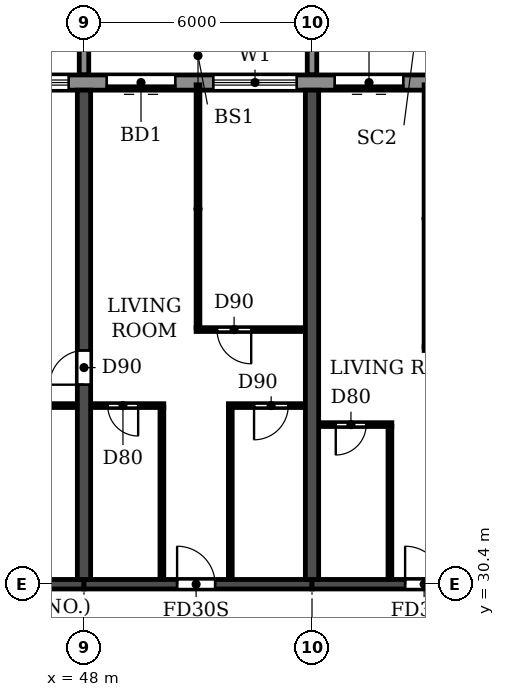
"""IFC4 building model, lengths in metres.
Left out: names, types, materials, properties, quantities, classifications, styles, units other than length and angle.
Written with IfcOpenShell. Run it as: python <this file> out.ifc"""

import sys

from ifc_helpers import new_model, si_unit, direction, frame, frame_2d, origin, place, context, subcontext, project, spatial, polyline, rectangle, outline, extrude, source, transform, mapped, element, fill, save


model = new_model("IFC4")
c1 = context("Model", 3, precision=1e-05, world=origin(), true_north=direction((0.0, 1.0)))
c2 = subcontext(c1, "Body", "Model", "MODEL_VIEW")
j1 = project(units=[si_unit("LENGTHUNIT", "METRE"), si_unit("PLANEANGLEUNIT", "RADIAN")], contexts=[c1])
p1 = place(None, origin())
s1 = spatial("IfcSite", under=j1, at=p1, CompositionType="ELEMENT")
p2 = place(p1, origin())
s2 = spatial("IfcBuilding", under=s1, at=p2, CompositionType="ELEMENT")
p3 = place(p2, frame((0.0, 0.0, 109.2)))
s3 = spatial("IfcBuildingStorey", under=s2, at=p3, CompositionType="ELEMENT", Elevation=109.2)
p4 = place(p3, frame((48.0, 30.525, 0.0), z_axis=(0.0, 0.0, 1.0), x_axis=(0.0, 1.0, 0.0)))
e1 = element("IfcWall", 1, at=p4, inside=s3, PredefinedType="SHEAR", context=c2, shape_type="SweptSolid", body=[
    extrude(rectangle(XDim=12.875, YDim=0.35, at=frame_2d((6.438, 0.0))), origin(), (0.0, 0.0, 1.0), 3.06),
])
p5 = place(p4, frame((5.125, 0.0, 0.0)))
e2 = element("IfcOpeningElement", 2, at=p5, cuts=e1, PredefinedType="OPENING", context=c2, shape_type="SweptSolid", body=[
    extrude(rectangle(XDim=0.9, YDim=2.1, at=frame_2d((0.45, 1.05))), frame((0.0, 0.185, 0.0), z_axis=(0.0, -1.0, 0.0), x_axis=(1.0, 0.0, 0.0)), (0.0, 0.0, 1.0), 0.37),
])
p6 = place(p3, frame((54.0, 30.525, 0.0), z_axis=(0.0, 0.0, 1.0), x_axis=(0.0, 1.0, 0.0)))
e3 = element("IfcWall", 3, at=p6, inside=s3, PredefinedType="SHEAR", context=c2, shape_type="SweptSolid", body=[
    extrude(rectangle(XDim=12.875, YDim=0.35, at=frame_2d((6.438, 0.0))), origin(), (0.0, 0.0, 1.0), 3.06),
])
p7 = place(p3, frame((42.0, 30.4, 0.0), z_axis=(0.0, 0.0, 1.0), x_axis=(1.0, 0.0, 0.0)))
e4 = element("IfcWall", 4, at=p7, inside=s3, PredefinedType="SHEAR", context=c2, shape_type="SweptSolid", body=[
    extrude(rectangle(XDim=6.0, YDim=0.25, at=frame_2d((3.0, 0.0))), origin(), (0.0, 0.0, 1.0), 2.46),
])
p8 = place(p3, frame((48.0, 30.4, 0.0), z_axis=(0.0, 0.0, 1.0), x_axis=(1.0, 0.0, 0.0)))
e5 = element("IfcWall", 5, at=p8, inside=s3, PredefinedType="SHEAR", context=c2, shape_type="SweptSolid", body=[
    extrude(rectangle(XDim=6.0, YDim=0.25, at=frame_2d((3.0, 0.0))), origin(), (0.0, 0.0, 1.0), 2.46),
])
p9 = place(p8, frame((2.45, 0.0, 0.0)))
e6 = element("IfcOpeningElement", 6, at=p9, cuts=e5, PredefinedType="OPENING", context=c2, shape_type="SweptSolid", body=[
    extrude(rectangle(XDim=1.0, YDim=2.1, at=frame_2d((0.5, 1.05))), frame((0.0, 0.135, 0.0), z_axis=(0.0, -1.0, 0.0), x_axis=(1.0, 0.0, 0.0)), (0.0, 0.0, 1.0), 0.27),
])
p10 = place(p3, frame((54.0, 30.4, 0.0), z_axis=(0.0, 0.0, 1.0), x_axis=(1.0, 0.0, 0.0)))
e7 = element("IfcWall", 7, at=p10, inside=s3, PredefinedType="SHEAR", context=c2, shape_type="SweptSolid", body=[
    extrude(rectangle(XDim=6.0, YDim=0.25, at=frame_2d((3.0, 0.0))), origin(), (0.0, 0.0, 1.0), 2.46),
])
p11 = place(p10, frame((2.45, 0.0, 0.0)))
e8 = element("IfcOpeningElement", 8, at=p11, cuts=e7, PredefinedType="OPENING", context=c2, shape_type="SweptSolid", body=[
    extrude(rectangle(XDim=1.0, YDim=2.1, at=frame_2d((0.5, 1.05))), frame((0.0, 0.135, 0.0), z_axis=(0.0, -1.0, 0.0), x_axis=(1.0, 0.0, 0.0)), (0.0, 0.0, 1.0), 0.27),
])
p12 = place(p3, frame((85.317, 43.6, 0.0), z_axis=(0.0, 0.0, 1.0), x_axis=(-1.0, 0.0, 0.0)))
e9 = element("IfcWall", 9, at=p12, inside=s3, PredefinedType="STANDARD", context=c2, shape_type="SweptSolid", body=[
    extrude(rectangle(XDim=68.634, YDim=0.4, at=frame_2d((34.317, 0.0))), origin(), (0.0, 0.0, 1.0), 3.06),
])
p13 = place(p12, frame((64.917, 0.0, 0.0)))
e10 = element("IfcOpeningElement", 10, at=p13, cuts=e9, PredefinedType="OPENING", context=c2, shape_type="SweptSolid", body=[
    extrude(rectangle(XDim=1.8, YDim=2.4, at=frame_2d((0.9, 1.2))), frame((0.0, 0.21, 0.0), z_axis=(0.0, -1.0, 0.0), x_axis=(1.0, 0.0, 0.0)), (0.0, 0.0, 1.0), 0.42),
])
p14 = place(p12, frame((61.717, 0.0, 0.9)))
e11 = element("IfcOpeningElement", 11, at=p14, cuts=e9, PredefinedType="OPENING", context=c2, shape_type="SweptSolid", body=[
    extrude(rectangle(XDim=2.2, YDim=1.5, at=frame_2d((1.1, 0.75))), frame((0.0, 0.21, 0.0), z_axis=(0.0, -1.0, 0.0), x_axis=(1.0, 0.0, 0.0)), (0.0, 0.0, 1.0), 0.42),
])
p15 = place(p12, frame((58.717, 0.0, 0.9)))
e12 = element("IfcOpeningElement", 12, at=p15, cuts=e9, PredefinedType="OPENING", context=c2, shape_type="SweptSolid", body=[
    extrude(rectangle(XDim=2.2, YDim=1.5, at=frame_2d((1.1, 0.75))), frame((0.0, 0.21, 0.0), z_axis=(0.0, -1.0, 0.0), x_axis=(1.0, 0.0, 0.0)), (0.0, 0.0, 1.0), 0.42),
])
p16 = place(p12, frame((55.917, 0.0, 0.0)))
e13 = element("IfcOpeningElement", 13, at=p16, cuts=e9, PredefinedType="OPENING", context=c2, shape_type="SweptSolid", body=[
    extrude(rectangle(XDim=1.8, YDim=2.4, at=frame_2d((0.9, 1.2))), frame((0.0, 0.21, 0.0), z_axis=(0.0, -1.0, 0.0), x_axis=(1.0, 0.0, 0.0)), (0.0, 0.0, 1.0), 0.42),
])
p17 = place(p12, frame((52.917, 0.0, 0.0)))
e14 = element("IfcOpeningElement", 14, at=p17, cuts=e9, PredefinedType="OPENING", context=c2, shape_type="SweptSolid", body=[
    extrude(rectangle(XDim=1.8, YDim=2.4, at=frame_2d((0.9, 1.2))), frame((0.0, 0.21, 0.0), z_axis=(0.0, -1.0, 0.0), x_axis=(1.0, 0.0, 0.0)), (0.0, 0.0, 1.0), 0.42),
])
p18 = place(p12, frame((49.717, 0.0, 0.9)))
e15 = element("IfcOpeningElement", 15, at=p18, cuts=e9, PredefinedType="OPENING", context=c2, shape_type="SweptSolid", body=[
    extrude(rectangle(XDim=2.2, YDim=1.5, at=frame_2d((1.1, 0.75))), frame((0.0, 0.21, 0.0), z_axis=(0.0, -1.0, 0.0), x_axis=(1.0, 0.0, 0.0)), (0.0, 0.0, 1.0), 0.42),
])
p19 = place(p12, frame((46.717, 0.0, 0.9)))
e16 = element("IfcOpeningElement", 16, at=p19, cuts=e9, PredefinedType="OPENING", context=c2, shape_type="SweptSolid", body=[
    extrude(rectangle(XDim=2.2, YDim=1.5, at=frame_2d((1.1, 0.75))), frame((0.0, 0.21, 0.0), z_axis=(0.0, -1.0, 0.0), x_axis=(1.0, 0.0, 0.0)), (0.0, 0.0, 1.0), 0.42),
])
p20 = place(p12, frame((43.917, 0.0, 0.0)))
e17 = element("IfcOpeningElement", 17, at=p20, cuts=e9, PredefinedType="OPENING", context=c2, shape_type="SweptSolid", body=[
    extrude(rectangle(XDim=1.8, YDim=2.4, at=frame_2d((0.9, 1.2))), frame((0.0, 0.21, 0.0), z_axis=(0.0, -1.0, 0.0), x_axis=(1.0, 0.0, 0.0)), (0.0, 0.0, 1.0), 0.42),
])
p21 = place(p12, frame((40.717, 0.0, 0.9)))
e18 = element("IfcOpeningElement", 18, at=p21, cuts=e9, PredefinedType="OPENING", context=c2, shape_type="SweptSolid", body=[
    extrude(rectangle(XDim=2.2, YDim=1.5, at=frame_2d((1.1, 0.75))), frame((0.0, 0.21, 0.0), z_axis=(0.0, -1.0, 0.0), x_axis=(1.0, 0.0, 0.0)), (0.0, 0.0, 1.0), 0.42),
])
p22 = place(p12, frame((37.717, 0.0, 0.9)))
e19 = element("IfcOpeningElement", 19, at=p22, cuts=e9, PredefinedType="OPENING", context=c2, shape_type="SweptSolid", body=[
    extrude(rectangle(XDim=2.2, YDim=1.5, at=frame_2d((1.1, 0.75))), frame((0.0, 0.21, 0.0), z_axis=(0.0, -1.0, 0.0), x_axis=(1.0, 0.0, 0.0)), (0.0, 0.0, 1.0), 0.42),
])
p23 = place(p12, frame((34.917, 0.0, 0.0)))
e20 = element("IfcOpeningElement", 20, at=p23, cuts=e9, PredefinedType="OPENING", context=c2, shape_type="SweptSolid", body=[
    extrude(rectangle(XDim=1.8, YDim=2.4, at=frame_2d((0.9, 1.2))), frame((0.0, 0.21, 0.0), z_axis=(0.0, -1.0, 0.0), x_axis=(1.0, 0.0, 0.0)), (0.0, 0.0, 1.0), 0.42),
])
p24 = place(p12, frame((31.717, 0.0, 0.9)))
e21 = element("IfcOpeningElement", 21, at=p24, cuts=e9, PredefinedType="OPENING", context=c2, shape_type="SweptSolid", body=[
    extrude(rectangle(XDim=2.2, YDim=1.5, at=frame_2d((1.1, 0.75))), frame((0.0, 0.21, 0.0), z_axis=(0.0, -1.0, 0.0), x_axis=(1.0, 0.0, 0.0)), (0.0, 0.0, 1.0), 0.42),
])
p25 = place(p12, frame((28.917, 0.0, 0.0)))
e22 = element("IfcOpeningElement", 22, at=p25, cuts=e9, PredefinedType="OPENING", context=c2, shape_type="SweptSolid", body=[
    extrude(rectangle(XDim=1.8, YDim=2.4, at=frame_2d((0.9, 1.2))), frame((0.0, 0.21, 0.0), z_axis=(0.0, -1.0, 0.0), x_axis=(1.0, 0.0, 0.0)), (0.0, 0.0, 1.0), 0.42),
])
p26 = place(p12, frame((25.717, 0.0, 0.9)))
e23 = element("IfcOpeningElement", 23, at=p26, cuts=e9, PredefinedType="OPENING", context=c2, shape_type="SweptSolid", body=[
    extrude(rectangle(XDim=2.2, YDim=1.5, at=frame_2d((1.1, 0.75))), frame((0.0, 0.21, 0.0), z_axis=(0.0, -1.0, 0.0), x_axis=(1.0, 0.0, 0.0)), (0.0, 0.0, 1.0), 0.42),
])
p27 = place(p12, frame((22.717, 0.0, 0.9)))
e24 = element("IfcOpeningElement", 24, at=p27, cuts=e9, PredefinedType="OPENING", context=c2, shape_type="SweptSolid", body=[
    extrude(rectangle(XDim=2.2, YDim=1.5, at=frame_2d((1.1, 0.75))), frame((0.0, 0.21, 0.0), z_axis=(0.0, -1.0, 0.0), x_axis=(1.0, 0.0, 0.0)), (0.0, 0.0, 1.0), 0.42),
])
p28 = place(p12, frame((19.917, 0.0, 0.0)))
e25 = element("IfcOpeningElement", 25, at=p28, cuts=e9, PredefinedType="OPENING", context=c2, shape_type="SweptSolid", body=[
    extrude(rectangle(XDim=1.8, YDim=2.4, at=frame_2d((0.9, 1.2))), frame((0.0, 0.21, 0.0), z_axis=(0.0, -1.0, 0.0), x_axis=(1.0, 0.0, 0.0)), (0.0, 0.0, 1.0), 0.42),
])
p29 = place(p12, frame((16.717, 0.0, 0.9)))
e26 = element("IfcOpeningElement", 26, at=p29, cuts=e9, PredefinedType="OPENING", context=c2, shape_type="SweptSolid", body=[
    extrude(rectangle(XDim=2.2, YDim=1.5, at=frame_2d((1.1, 0.75))), frame((0.0, 0.21, 0.0), z_axis=(0.0, -1.0, 0.0), x_axis=(1.0, 0.0, 0.0)), (0.0, 0.0, 1.0), 0.42),
])
p30 = place(p12, frame((13.917, 0.0, 0.0)))
e27 = element("IfcOpeningElement", 27, at=p30, cuts=e9, PredefinedType="OPENING", context=c2, shape_type="SweptSolid", body=[
    extrude(rectangle(XDim=1.8, YDim=2.4, at=frame_2d((0.9, 1.2))), frame((0.0, 0.21, 0.0), z_axis=(0.0, -1.0, 0.0), x_axis=(1.0, 0.0, 0.0)), (0.0, 0.0, 1.0), 0.42),
])
p31 = place(p12, frame((10.717, 0.0, 0.9)))
e28 = element("IfcOpeningElement", 28, at=p31, cuts=e9, PredefinedType="OPENING", context=c2, shape_type="SweptSolid", body=[
    extrude(rectangle(XDim=2.2, YDim=1.5, at=frame_2d((1.1, 0.75))), frame((0.0, 0.21, 0.0), z_axis=(0.0, -1.0, 0.0), x_axis=(1.0, 0.0, 0.0)), (0.0, 0.0, 1.0), 0.42),
])
p32 = place(p12, frame((7.717, 0.0, 0.9)))
e29 = element("IfcOpeningElement", 29, at=p32, cuts=e9, PredefinedType="OPENING", context=c2, shape_type="SweptSolid", body=[
    extrude(rectangle(XDim=2.2, YDim=1.5, at=frame_2d((1.1, 0.75))), frame((0.0, 0.21, 0.0), z_axis=(0.0, -1.0, 0.0), x_axis=(1.0, 0.0, 0.0)), (0.0, 0.0, 1.0), 0.42),
])
p33 = place(p12, frame((4.917, 0.0, 0.0)))
e30 = element("IfcOpeningElement", 30, at=p33, cuts=e9, PredefinedType="OPENING", context=c2, shape_type="SweptSolid", body=[
    extrude(rectangle(XDim=1.8, YDim=2.4, at=frame_2d((0.9, 1.2))), frame((0.0, 0.21, 0.0), z_axis=(0.0, -1.0, 0.0), x_axis=(1.0, 0.0, 0.0)), (0.0, 0.0, 1.0), 0.42),
])
p34 = place(p12, frame((1.717, 0.0, 0.9)))
e31 = element("IfcOpeningElement", 31, at=p34, cuts=e9, PredefinedType="OPENING", context=c2, shape_type="SweptSolid", body=[
    extrude(rectangle(XDim=2.2, YDim=1.5, at=frame_2d((1.1, 0.75))), frame((0.0, 0.21, 0.0), z_axis=(0.0, -1.0, 0.0), x_axis=(1.0, 0.0, 0.0)), (0.0, 0.0, 1.0), 0.42),
])
m1 = source(origin(), c2, "Body", "SweptSolid", [
    extrude(outline(polyline([(0.0, 0.0), (0.25, 0.0), (0.25, 3.1), (0.0, 3.1), (0.0, 0.0)])), origin(), (0.0, 0.0, 1.0), 3.1),
])
for number, where in (
    (32, (47.875, 43.8, 0.0)),
    (33, (53.875, 43.8, 0.0)),
):
    element("IfcWall", number, at=place(p3, frame(where)), inside=s3, PredefinedType="STANDARD", context=c2, shape_type="MappedRepresentation", body=[
        mapped(m1, transform((0.0, 0.0, 0.0))),
    ])
p35 = place(p3, frame((54.185, 34.6, 0.0), z_axis=(0.0, 0.0, 1.0), x_axis=(1.0, 0.0, 0.0)))
e34 = element("IfcWall", 34, at=p35, inside=s3, PredefinedType="PARTITIONING", context=c2, shape_type="SweptSolid", body=[
    extrude(rectangle(XDim=1.915, YDim=0.1, at=frame_2d((0.958, 0.0))), origin(), (0.0, 0.0, 1.0), 3.06),
])
p36 = place(p35, frame((0.44, 0.0, 0.0)))
e35 = element("IfcOpeningElement", 35, at=p36, cuts=e34, PredefinedType="OPENING", context=c2, shape_type="SweptSolid", body=[
    extrude(rectangle(XDim=0.8, YDim=2.1, at=frame_2d((0.4, 1.05))), frame((0.0, 0.06, 0.0), z_axis=(0.0, -1.0, 0.0), x_axis=(1.0, 0.0, 0.0)), (0.0, 0.0, 1.0), 0.12),
])
p37 = place(p3, frame((45.1, 35.1, 0.0), z_axis=(0.0, 0.0, 1.0), x_axis=(1.0, 0.0, 0.0)))
e36 = element("IfcWall", 36, at=p37, inside=s3, PredefinedType="PARTITIONING", context=c2, shape_type="SweptSolid", body=[
    extrude(rectangle(XDim=2.715, YDim=0.1, at=frame_2d((1.357, 0.0))), origin(), (0.0, 0.0, 1.0), 3.06),
])
p38 = place(p37, frame((1.0, 0.0, 0.0)))
e37 = element("IfcOpeningElement", 37, at=p38, cuts=e36, PredefinedType="OPENING", context=c2, shape_type="SweptSolid", body=[
    extrude(rectangle(XDim=0.8, YDim=2.1, at=frame_2d((0.4, 1.05))), frame((0.0, 0.06, 0.0), z_axis=(0.0, -1.0, 0.0), x_axis=(1.0, 0.0, 0.0)), (0.0, 0.0, 1.0), 0.12),
])
p39 = place(p3, frame((48.185, 35.1, 0.0), z_axis=(0.0, 0.0, 1.0), x_axis=(1.0, 0.0, 0.0)))
e38 = element("IfcWall", 38, at=p39, inside=s3, PredefinedType="PARTITIONING", context=c2, shape_type="SweptSolid", body=[
    extrude(rectangle(XDim=1.915, YDim=0.1, at=frame_2d((0.958, 0.0))), origin(), (0.0, 0.0, 1.0), 3.06),
])
p40 = place(p39, frame((0.44, 0.0, 0.0)))
e39 = element("IfcOpeningElement", 39, at=p40, cuts=e38, PredefinedType="OPENING", context=c2, shape_type="SweptSolid", body=[
    extrude(rectangle(XDim=0.8, YDim=2.1, at=frame_2d((0.4, 1.05))), frame((0.0, 0.06, 0.0), z_axis=(0.0, -1.0, 0.0), x_axis=(1.0, 0.0, 0.0)), (0.0, 0.0, 1.0), 0.12),
])
p41 = place(p3, frame((51.8, 35.1, 0.0), z_axis=(0.0, 0.0, 1.0), x_axis=(1.0, 0.0, 0.0)))
e40 = element("IfcWall", 40, at=p41, inside=s3, PredefinedType="PARTITIONING", context=c2, shape_type="SweptSolid", body=[
    extrude(rectangle(XDim=2.015, YDim=0.1, at=frame_2d((1.007, 0.0))), origin(), (0.0, 0.0, 1.0), 3.06),
])
p42 = place(p41, frame((0.675, 0.0, 0.0)))
e41 = element("IfcOpeningElement", 41, at=p42, cuts=e40, PredefinedType="OPENING", context=c2, shape_type="SweptSolid", body=[
    extrude(rectangle(XDim=0.9, YDim=2.1, at=frame_2d((0.45, 1.05))), frame((0.0, 0.06, 0.0), z_axis=(0.0, -1.0, 0.0), x_axis=(1.0, 0.0, 0.0)), (0.0, 0.0, 1.0), 0.12),
])
p43 = place(p3, frame((56.95, 36.6, 0.0), z_axis=(0.0, 0.0, 1.0), x_axis=(1.0, 0.0, 0.0)))
e42 = element("IfcWall", 42, at=p43, inside=s3, PredefinedType="PARTITIONING", context=c2, shape_type="SweptSolid", body=[
    extrude(rectangle(XDim=2.865, YDim=0.1, at=frame_2d((1.433, 0.0))), origin(), (0.0, 0.0, 1.0), 3.06),
])
p44 = place(p43, frame((1.65, 0.0, 0.0)))
e43 = element("IfcOpeningElement", 43, at=p44, cuts=e42, PredefinedType="OPENING", context=c2, shape_type="SweptSolid", body=[
    extrude(rectangle(XDim=0.9, YDim=2.1, at=frame_2d((0.45, 1.05))), frame((0.0, 0.06, 0.0), z_axis=(0.0, -1.0, 0.0), x_axis=(1.0, 0.0, 0.0)), (0.0, 0.0, 1.0), 0.12),
])
p45 = place(p3, frame((50.95, 37.1, 0.0), z_axis=(0.0, 0.0, 1.0), x_axis=(1.0, 0.0, 0.0)))
e44 = element("IfcWall", 44, at=p45, inside=s3, PredefinedType="PARTITIONING", context=c2, shape_type="SweptSolid", body=[
    extrude(rectangle(XDim=2.865, YDim=0.1, at=frame_2d((1.433, 0.0))), origin(), (0.0, 0.0, 1.0), 3.06),
])
p46 = place(p45, frame((0.55, 0.0, 0.0)))
e45 = element("IfcOpeningElement", 45, at=p46, cuts=e44, PredefinedType="OPENING", context=c2, shape_type="SweptSolid", body=[
    extrude(rectangle(XDim=0.9, YDim=2.1, at=frame_2d((0.45, 1.05))), frame((0.0, 0.06, 0.0), z_axis=(0.0, -1.0, 0.0), x_axis=(1.0, 0.0, 0.0)), (0.0, 0.0, 1.0), 0.12),
])
p47 = place(p3, frame((50.05, 30.535, 0.0), z_axis=(0.0, 0.0, 1.0), x_axis=(0.0, 1.0, 0.0)))
e46 = element("IfcWall", 46, at=p47, inside=s3, PredefinedType="PARTITIONING", context=c2, shape_type="SweptSolid", body=[
    extrude(rectangle(XDim=4.515, YDim=0.1, at=frame_2d((2.258, 0.0))), origin(), (0.0, 0.0, 1.0), 3.06),
])
p48 = place(p3, frame((51.0, 37.15, 0.0), z_axis=(0.0, 0.0, 1.0), x_axis=(0.0, 1.0, 0.0)))
e47 = element("IfcWall", 47, at=p48, inside=s3, PredefinedType="PARTITIONING", context=c2, shape_type="SweptSolid", body=[
    extrude(rectangle(XDim=6.39, YDim=0.1, at=frame_2d((3.195, 0.0))), origin(), (0.0, 0.0, 1.0), 3.06),
])
p49 = place(p3, frame((51.85, 30.535, 0.0), z_axis=(0.0, 0.0, 1.0), x_axis=(0.0, 1.0, 0.0)))
e48 = element("IfcWall", 48, at=p49, inside=s3, PredefinedType="PARTITIONING", context=c2, shape_type="SweptSolid", body=[
    extrude(rectangle(XDim=4.515, YDim=0.1, at=frame_2d((2.258, 0.0))), origin(), (0.0, 0.0, 1.0), 3.06),
])
p50 = place(p3, frame((56.05, 30.535, 0.0), z_axis=(0.0, 0.0, 1.0), x_axis=(0.0, 1.0, 0.0)))
e49 = element("IfcWall", 49, at=p50, inside=s3, PredefinedType="PARTITIONING", context=c2, shape_type="SweptSolid", body=[
    extrude(rectangle(XDim=4.015, YDim=0.1, at=frame_2d((2.008, 0.0))), origin(), (0.0, 0.0, 1.0), 3.06),
])
p51 = place(p3, frame((57.0, 36.65, 0.0), z_axis=(0.0, 0.0, 1.0), x_axis=(0.0, 1.0, 0.0)))
e50 = element("IfcWall", 50, at=p51, inside=s3, PredefinedType="PARTITIONING", context=c2, shape_type="SweptSolid", body=[
    extrude(rectangle(XDim=6.89, YDim=0.1, at=frame_2d((3.445, 0.0))), origin(), (0.0, 0.0, 1.0), 3.06),
])
p52 = place(p22, origin())
e51 = element("IfcWindow", 51, at=p52, inside=s3, PartitioningType="DOUBLE_PANEL_HORIZONTAL", PredefinedType="WINDOW", context=c2, shape_type="SweptSolid", body=[
    extrude(rectangle(XDim=2.2, YDim=1.5, at=frame_2d((1.1, 0.75))), frame((0.0, 0.03, 0.0), z_axis=(0.0, -1.0, 0.0), x_axis=(1.0, 0.0, 0.0)), (0.0, 0.0, 1.0), 0.06),
])
fill(e19, e51)
p53 = place(p23, origin())
e52 = element("IfcDoor", 52, at=p53, inside=s3, OperationType="DOUBLE_DOOR_SLIDING", PredefinedType="DOOR", context=c2, shape_type="SweptSolid", body=[
    extrude(rectangle(XDim=1.8, YDim=2.4, at=frame_2d((0.9, 1.2))), frame((0.0, 0.025, 0.0), z_axis=(0.0, -1.0, 0.0), x_axis=(1.0, 0.0, 0.0)), (0.0, 0.0, 1.0), 0.05),
])
fill(e20, e52)
p54 = place(p24, origin())
e53 = element("IfcWindow", 53, at=p54, inside=s3, PartitioningType="DOUBLE_PANEL_HORIZONTAL", PredefinedType="WINDOW", context=c2, shape_type="SweptSolid", body=[
    extrude(rectangle(XDim=2.2, YDim=1.5, at=frame_2d((1.1, 0.75))), frame((0.0, 0.03, 0.0), z_axis=(0.0, -1.0, 0.0), x_axis=(1.0, 0.0, 0.0)), (0.0, 0.0, 1.0), 0.06),
])
fill(e21, e53)
p55 = place(p25, origin())
e54 = element("IfcDoor", 54, at=p55, inside=s3, OperationType="DOUBLE_DOOR_SLIDING", PredefinedType="DOOR", context=c2, shape_type="SweptSolid", body=[
    extrude(rectangle(XDim=1.8, YDim=2.4, at=frame_2d((0.9, 1.2))), frame((0.0, 0.025, 0.0), z_axis=(0.0, -1.0, 0.0), x_axis=(1.0, 0.0, 0.0)), (0.0, 0.0, 1.0), 0.05),
])
fill(e22, e54)
p56 = place(p5, origin())
e55 = element("IfcDoor", 55, at=p56, inside=s3, OperationType="SINGLE_SWING_LEFT", PredefinedType="DOOR", context=c2, shape_type="SweptSolid", body=[
    extrude(rectangle(XDim=0.9, YDim=2.1, at=frame_2d((0.45, 1.05))), frame((0.0, 0.025, 0.0), z_axis=(0.0, -1.0, 0.0), x_axis=(1.0, 0.0, 0.0)), (0.0, 0.0, 1.0), 0.05),
])
fill(e2, e55)
p57 = place(p40, frame((0.8, 0.0, 0.0), z_axis=(0.0, 0.0, 1.0), x_axis=(-1.0, 0.0, 0.0)))
e56 = element("IfcDoor", 56, at=p57, inside=s3, OperationType="SINGLE_SWING_LEFT", PredefinedType="DOOR", context=c2, shape_type="SweptSolid", body=[
    extrude(rectangle(XDim=0.8, YDim=2.1, at=frame_2d((0.4, 1.05))), frame((0.0, 0.025, 0.0), z_axis=(0.0, -1.0, 0.0), x_axis=(1.0, 0.0, 0.0)), (0.0, 0.0, 1.0), 0.05),
])
fill(e39, e56)
p58 = place(p9, origin())
e57 = element("IfcDoor", 57, at=p58, inside=s3, OperationType="SINGLE_SWING_LEFT", PredefinedType="DOOR", context=c2, shape_type="SweptSolid", body=[
    extrude(rectangle(XDim=1.0, YDim=2.1, at=frame_2d((0.5, 1.05))), frame((0.0, 0.025, 0.0), z_axis=(0.0, -1.0, 0.0), x_axis=(1.0, 0.0, 0.0)), (0.0, 0.0, 1.0), 0.05),
])
fill(e6, e57)
p59 = place(p46, frame((0.9, 0.0, 0.0), z_axis=(0.0, 0.0, 1.0), x_axis=(-1.0, 0.0, 0.0)))
e58 = element("IfcDoor", 58, at=p59, inside=s3, OperationType="SINGLE_SWING_LEFT", PredefinedType="DOOR", context=c2, shape_type="SweptSolid", body=[
    extrude(rectangle(XDim=0.9, YDim=2.1, at=frame_2d((0.45, 1.05))), frame((0.0, 0.025, 0.0), z_axis=(0.0, -1.0, 0.0), x_axis=(1.0, 0.0, 0.0)), (0.0, 0.0, 1.0), 0.05),
])
fill(e45, e58)
p60 = place(p42, frame((0.9, 0.0, 0.0), z_axis=(0.0, 0.0, 1.0), x_axis=(-1.0, 0.0, 0.0)))
e59 = element("IfcDoor", 59, at=p60, inside=s3, OperationType="SINGLE_SWING_RIGHT", PredefinedType="DOOR", context=c2, shape_type="SweptSolid", body=[
    extrude(rectangle(XDim=0.9, YDim=2.1, at=frame_2d((0.45, 1.05))), frame((0.0, 0.025, 0.0), z_axis=(0.0, -1.0, 0.0), x_axis=(1.0, 0.0, 0.0)), (0.0, 0.0, 1.0), 0.05),
])
fill(e41, e59)
p61 = place(p36, frame((0.8, 0.0, 0.0), z_axis=(0.0, 0.0, 1.0), x_axis=(-1.0, 0.0, 0.0)))
e60 = element("IfcDoor", 60, at=p61, inside=s3, OperationType="SINGLE_SWING_RIGHT", PredefinedType="DOOR", context=c2, shape_type="SweptSolid", body=[
    extrude(rectangle(XDim=0.8, YDim=2.1, at=frame_2d((0.4, 1.05))), frame((0.0, 0.025, 0.0), z_axis=(0.0, -1.0, 0.0), x_axis=(1.0, 0.0, 0.0)), (0.0, 0.0, 1.0), 0.05),
])
fill(e35, e60)
p62 = place(p11, origin())
e61 = element("IfcDoor", 61, at=p62, inside=s3, OperationType="SINGLE_SWING_LEFT", PredefinedType="DOOR", context=c2, shape_type="SweptSolid", body=[
    extrude(rectangle(XDim=1.0, YDim=2.1, at=frame_2d((0.5, 1.05))), frame((0.0, 0.025, 0.0), z_axis=(0.0, -1.0, 0.0), x_axis=(1.0, 0.0, 0.0)), (0.0, 0.0, 1.0), 0.05),
])
fill(e8, e61)
save(model, sys.argv[1])
